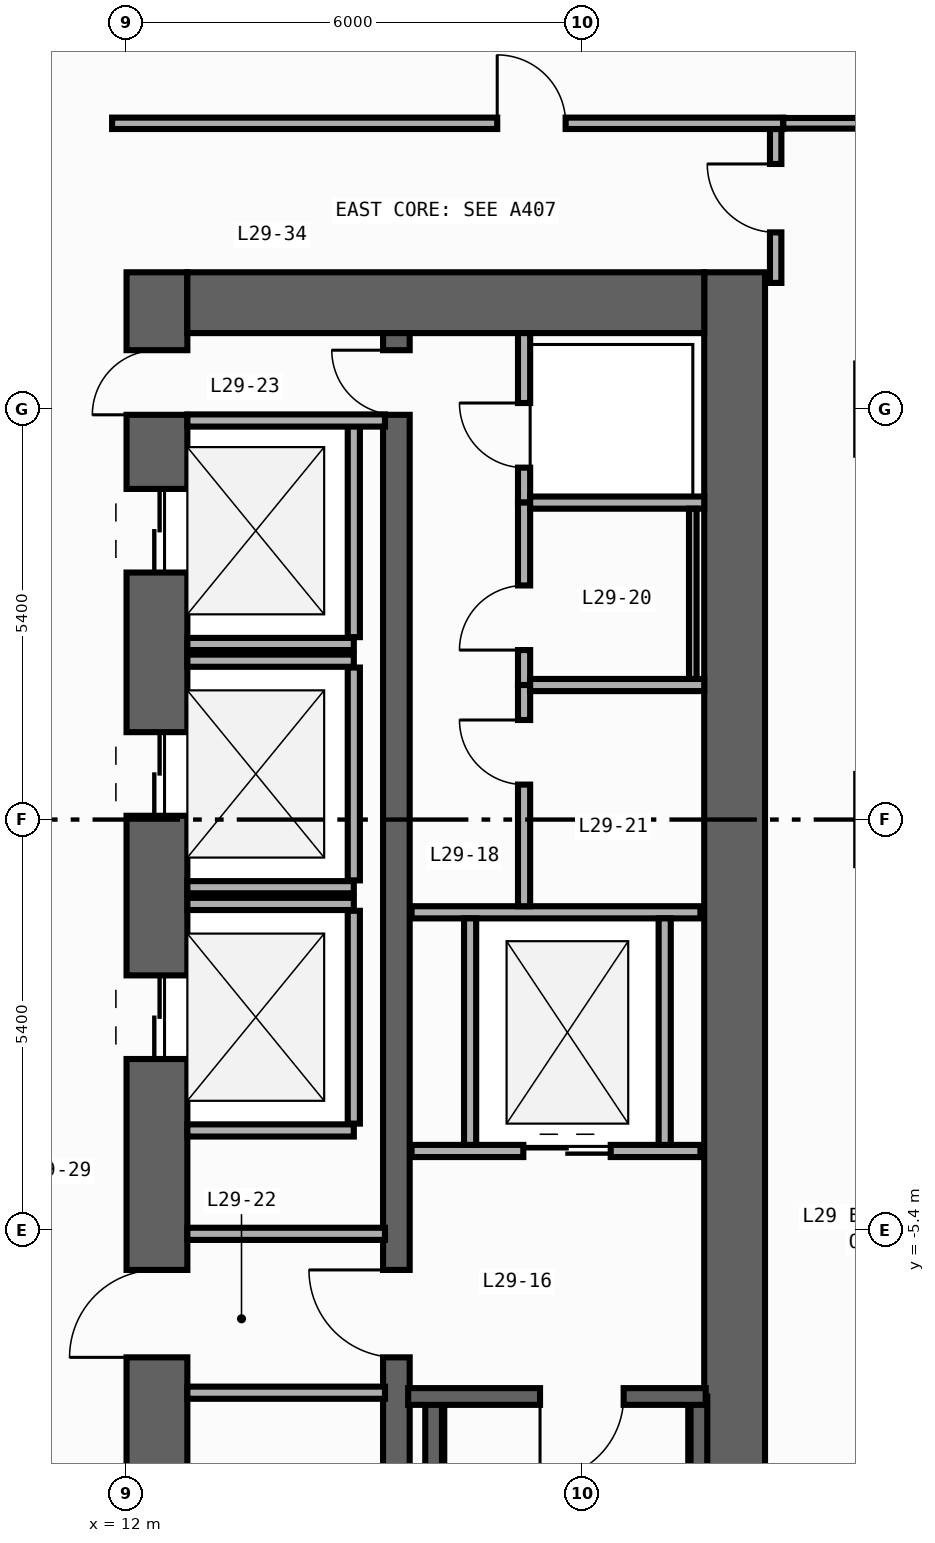
"""IFC4 building model, lengths in metres.
Left out: names, types, materials, properties, quantities, classifications, styles, units other than length and angle.
Written with IfcOpenShell. Run it as: python <this file> out.ifc"""

import sys

from ifc_helpers import new_model, si_unit, direction, frame, frame_2d, origin, origin_2d, place, context, subcontext, project, spatial, rectangle, extrude, element, fill, save


model = new_model("IFC4")
c1 = context("Model", 3, precision=1e-05, world=origin(), true_north=direction((0.0, 1.0)))
c2 = subcontext(c1, "Body", "Model", "MODEL_VIEW")
j1 = project(units=[si_unit("LENGTHUNIT", "METRE"), si_unit("PLANEANGLEUNIT", "RADIAN")], contexts=[c1])
p1 = place(None, origin())
s1 = spatial("IfcSite", under=j1, at=p1, CompositionType="ELEMENT")
p2 = place(p1, origin())
s2 = spatial("IfcBuilding", under=s1, at=p2, CompositionType="ELEMENT")
p3 = place(p2, frame((0.0, 0.0, 126.8)))
s3 = spatial("IfcBuildingStorey", under=s2, at=p3, CompositionType="ELEMENT", Elevation=126.8)
p4 = place(p3, frame((12.4, -19.8, 0.0), z_axis=(0.0, 0.0, 1.0), x_axis=(0.0, 1.0, 0.0)))
e1 = element("IfcWall", 1, at=p4, inside=s3, PredefinedType="SHEAR", context=c2, shape_type="SweptSolid", body=[
    extrude(rectangle(XDim=27.0, YDim=0.8, at=frame_2d((13.5, 0.0))), origin(), (0.0, 0.0, 1.0), 3.94),
])
p5 = place(p4, frame((23.05, 0.0, 0.0)))
e2 = element("IfcOpeningElement", 2, at=p5, cuts=e1, PredefinedType="OPENING", context=c2, shape_type="SweptSolid", body=[
    extrude(rectangle(XDim=1.1, YDim=2.2, at=frame_2d((0.55, 1.1))), frame((0.0, 0.41, 0.0), z_axis=(0.0, -1.0, 0.0), x_axis=(1.0, 0.0, 0.0)), (0.0, 0.0, 1.0), 0.82),
])
p6 = place(p4, frame((19.85, 0.0, 0.0)))
e3 = element("IfcOpeningElement", 3, at=p6, cuts=e1, PredefinedType="OPENING", context=c2, shape_type="SweptSolid", body=[
    extrude(rectangle(XDim=1.1, YDim=2.2, at=frame_2d((0.55, 1.1))), frame((0.0, 0.41, 0.0), z_axis=(0.0, -1.0, 0.0), x_axis=(1.0, 0.0, 0.0)), (0.0, 0.0, 1.0), 0.82),
])
p7 = place(p4, frame((16.65, 0.0, 0.0)))
e4 = element("IfcOpeningElement", 4, at=p7, cuts=e1, PredefinedType="OPENING", context=c2, shape_type="SweptSolid", body=[
    extrude(rectangle(XDim=1.1, YDim=2.2, at=frame_2d((0.55, 1.1))), frame((0.0, 0.41, 0.0), z_axis=(0.0, -1.0, 0.0), x_axis=(1.0, 0.0, 0.0)), (0.0, 0.0, 1.0), 0.82),
])
p8 = place(p4, frame((10.175, 0.0, 0.0)))
e5 = element("IfcOpeningElement", 5, at=p8, cuts=e1, PredefinedType="OPENING", context=c2, shape_type="SweptSolid", body=[
    extrude(rectangle(XDim=0.85, YDim=2.1, at=frame_2d((0.425, 1.05))), frame((0.0, 0.41, 0.0), z_axis=(0.0, -1.0, 0.0), x_axis=(1.0, 0.0, 0.0)), (0.0, 0.0, 1.0), 0.82),
])
p9 = place(p4, frame((12.725, 0.0, 0.0)))
e6 = element("IfcOpeningElement", 6, at=p9, cuts=e1, PredefinedType="OPENING", context=c2, shape_type="SweptSolid", body=[
    extrude(rectangle(XDim=1.15, YDim=2.2, at=frame_2d((0.575, 1.1))), frame((0.0, 0.41, 0.0), z_axis=(0.0, -1.0, 0.0), x_axis=(1.0, 0.0, 0.0)), (0.0, 0.0, 1.0), 0.82),
])
p10 = place(p4, frame((25.125, 0.0, 0.0)))
e7 = element("IfcOpeningElement", 7, at=p10, cuts=e1, PredefinedType="OPENING", context=c2, shape_type="SweptSolid", body=[
    extrude(rectangle(XDim=0.85, YDim=2.1, at=frame_2d((0.425, 1.05))), frame((0.0, 0.41, 0.0), z_axis=(0.0, -1.0, 0.0), x_axis=(1.0, 0.0, 0.0)), (0.0, 0.0, 1.0), 0.82),
])
p11 = place(p3, frame((20.0, -19.8, 0.0), z_axis=(0.0, 0.0, 1.0), x_axis=(0.0, 1.0, 0.0)))
e8 = element("IfcWall", 8, at=p11, inside=s3, PredefinedType="SHEAR", context=c2, shape_type="SweptSolid", body=[
    extrude(rectangle(XDim=27.0, YDim=0.8, at=frame_2d((13.5, 0.0))), origin(), (0.0, 0.0, 1.0), 3.94),
])
p12 = place(p3, frame((12.8, 6.8, 0.0), z_axis=(0.0, 0.0, 1.0), x_axis=(1.0, 0.0, 0.0)))
e9 = element("IfcWall", 9, at=p12, inside=s3, PredefinedType="SHEAR", context=c2, shape_type="SweptSolid", body=[
    extrude(rectangle(XDim=6.8, YDim=0.8, at=frame_2d((3.4, 0.0))), origin(), (0.0, 0.0, 1.0), 3.94),
])
p13 = place(p3, frame((15.55, -19.0, 0.0), z_axis=(0.0, 0.0, 1.0), x_axis=(0.0, 1.0, 0.0)))
e10 = element("IfcWall", 10, at=p13, inside=s3, PredefinedType="SHEAR", context=c2, shape_type="SweptSolid", body=[
    extrude(rectangle(XDim=25.4, YDim=0.35, at=frame_2d((12.7, 0.0))), origin(), (0.0, 0.0, 1.0), 3.94),
])
p14 = place(p13, frame((11.925, 0.0, 0.0)))
e11 = element("IfcOpeningElement", 11, at=p14, cuts=e10, PredefinedType="OPENING", context=c2, shape_type="SweptSolid", body=[
    extrude(rectangle(XDim=1.15, YDim=2.2, at=frame_2d((0.575, 1.1))), frame((0.0, 0.185, 0.0), z_axis=(0.0, -1.0, 0.0), x_axis=(1.0, 0.0, 0.0)), (0.0, 0.0, 1.0), 0.37),
])
p15 = place(p13, frame((24.325, 0.0, 0.0)))
e12 = element("IfcOpeningElement", 12, at=p15, cuts=e10, PredefinedType="OPENING", context=c2, shape_type="SweptSolid", body=[
    extrude(rectangle(XDim=0.85, YDim=2.1, at=frame_2d((0.425, 1.05))), frame((0.0, 0.185, 0.0), z_axis=(0.0, -1.0, 0.0), x_axis=(1.0, 0.0, 0.0)), (0.0, 0.0, 1.0), 0.37),
])
for number, where, z_axis, x_axis in (
    (13, (16.04, -18.89, 0.0), (0.0, 0.0, 1.0), (0.0, 1.0, 0.0)),
    (14, (19.53, -18.89, 0.0), (0.0, 0.0, 1.0), (0.0, 1.0, 0.0)),
):
    element("IfcWall", number, at=place(p3, frame(where, z_axis=z_axis, x_axis=x_axis)), inside=s3, PredefinedType="SHEAR", context=c2, shape_type="SweptSolid", body=[
        extrude(rectangle(XDim=11.3, YDim=0.22, at=frame_2d((5.65, 0.0))), origin(), (0.0, 0.0, 1.0), 3.94),
    ])
p16 = place(p3, frame((19.62, -7.59, 0.0), z_axis=(0.0, 0.0, 1.0), x_axis=(-1.0, 0.0, 0.0)))
e15 = element("IfcWall", 15, at=p16, inside=s3, PredefinedType="SHEAR", context=c2, shape_type="SweptSolid", body=[
    extrude(rectangle(XDim=3.915, YDim=0.22, at=frame_2d((1.958, 0.0))), origin(), (0.0, 0.0, 1.0), 3.94),
])
p17 = place(p16, frame((1.08, 0.0, 0.0)))
e16 = element("IfcOpeningElement", 16, at=p17, cuts=e15, PredefinedType="OPENING", context=c2, shape_type="SweptSolid", body=[
    extrude(rectangle(XDim=1.1, YDim=2.2, at=frame_2d((0.55, 1.1))), frame((0.0, 0.12, 0.0), z_axis=(0.0, -1.0, 0.0), x_axis=(1.0, 0.0, 0.0)), (0.0, 0.0, 1.0), 0.24),
])
for number, where, z_axis, x_axis in (
    (17, (22.2, 0.0, 0.0), (0.0, 0.0, 1.0), (1.0, 0.0, 0.0)),
    (18, (22.2, 5.4, 0.0), (0.0, 0.0, 1.0), (1.0, 0.0, 0.0)),
):
    element("IfcColumn", number, at=place(p3, frame(where, z_axis=z_axis, x_axis=x_axis)), inside=s3, PredefinedType="COLUMN", context=c2, shape_type="SweptSolid", body=[
        extrude(rectangle(XDim=1.2, YDim=1.2, at=origin_2d()), origin(), (0.0, 0.0, 1.0), 4.2),
    ])
p18 = place(p3, frame((12.8, 2.31, 0.0), z_axis=(0.0, 0.0, 1.0), x_axis=(1.0, 0.0, 0.0)))
e19 = element("IfcWall", 19, at=p18, inside=s3, PredefinedType="STANDARD", context=c2, shape_type="SweptSolid", body=[
    extrude(rectangle(XDim=2.19, YDim=0.16, at=frame_2d((1.095, 0.0))), origin(), (0.0, 0.0, 1.0), 3.94),
])
p19 = place(p3, frame((14.99, 2.4, 0.0), z_axis=(0.0, 0.0, 1.0), x_axis=(0.0, 1.0, 0.0)))
e20 = element("IfcWall", 20, at=p19, inside=s3, PredefinedType="STANDARD", context=c2, shape_type="SweptSolid", body=[
    extrude(rectangle(XDim=2.8, YDim=0.16, at=frame_2d((1.4, 0.0))), origin(), (0.0, 0.0, 1.0), 3.94),
])
for number, where, z_axis, x_axis in (
    (21, (12.8, -0.89, 0.0), (0.0, 0.0, 1.0), (1.0, 0.0, 0.0)),
    (22, (12.8, 2.09, 0.0), (0.0, 0.0, 1.0), (1.0, 0.0, 0.0)),
):
    element("IfcWall", number, at=place(p3, frame(where, z_axis=z_axis, x_axis=x_axis)), inside=s3, PredefinedType="STANDARD", context=c2, shape_type="SweptSolid", body=[
        extrude(rectangle(XDim=2.19, YDim=0.16, at=frame_2d((1.095, 0.0))), origin(), (0.0, 0.0, 1.0), 3.94),
    ])
p20 = place(p3, frame((14.99, -0.8, 0.0), z_axis=(0.0, 0.0, 1.0), x_axis=(0.0, 1.0, 0.0)))
e23 = element("IfcWall", 23, at=p20, inside=s3, PredefinedType="STANDARD", context=c2, shape_type="SweptSolid", body=[
    extrude(rectangle(XDim=2.8, YDim=0.16, at=frame_2d((1.4, 0.0))), origin(), (0.0, 0.0, 1.0), 3.94),
])
for number, where, z_axis, x_axis in (
    (24, (12.8, -4.09, 0.0), (0.0, 0.0, 1.0), (1.0, 0.0, 0.0)),
    (25, (12.8, -1.11, 0.0), (0.0, 0.0, 1.0), (1.0, 0.0, 0.0)),
):
    element("IfcWall", number, at=place(p3, frame(where, z_axis=z_axis, x_axis=x_axis)), inside=s3, PredefinedType="STANDARD", context=c2, shape_type="SweptSolid", body=[
        extrude(rectangle(XDim=2.19, YDim=0.16, at=frame_2d((1.095, 0.0))), origin(), (0.0, 0.0, 1.0), 3.94),
    ])
p21 = place(p3, frame((14.99, -4.0, 0.0), z_axis=(0.0, 0.0, 1.0), x_axis=(0.0, 1.0, 0.0)))
e26 = element("IfcWall", 26, at=p21, inside=s3, PredefinedType="STANDARD", context=c2, shape_type="SweptSolid", body=[
    extrude(rectangle(XDim=2.8, YDim=0.16, at=frame_2d((1.4, 0.0))), origin(), (0.0, 0.0, 1.0), 3.94),
])
p22 = place(p3, frame((15.75, -4.36, 0.0), z_axis=(0.0, 0.0, 1.0), x_axis=(1.0, 0.0, 0.0)))
e27 = element("IfcWall", 27, at=p22, inside=s3, PredefinedType="STANDARD", context=c2, shape_type="SweptSolid", body=[
    extrude(rectangle(XDim=3.8, YDim=0.16, at=frame_2d((1.9, 0.0))), origin(), (0.0, 0.0, 1.0), 3.94),
])
p23 = place(p22, frame((1.47, 0.0, 0.0)))
e28 = element("IfcOpeningElement", 28, at=p23, cuts=e27, PredefinedType="OPENING", context=c2, shape_type="SweptSolid", body=[
    extrude(rectangle(XDim=1.15, YDim=2.2, at=frame_2d((0.575, 1.1))), frame((0.0, 0.09, 0.0), z_axis=(0.0, -1.0, 0.0), x_axis=(1.0, 0.0, 0.0)), (0.0, 0.0, 1.0), 0.18),
])
p24 = place(p3, frame((15.75, -1.22, 0.0), z_axis=(0.0, 0.0, 1.0), x_axis=(1.0, 0.0, 0.0)))
e29 = element("IfcWall", 29, at=p24, inside=s3, PredefinedType="STANDARD", context=c2, shape_type="SweptSolid", body=[
    extrude(rectangle(XDim=3.8, YDim=0.16, at=frame_2d((1.9, 0.0))), origin(), (0.0, 0.0, 1.0), 3.94),
])
for number, where, z_axis, x_axis in (
    (30, (16.52, -4.28, 0.0), (0.0, 0.0, 1.0), (0.0, 1.0, 0.0)),
    (31, (19.08, -4.28, 0.0), (0.0, 0.0, 1.0), (0.0, 1.0, 0.0)),
):
    element("IfcWall", number, at=place(p3, frame(where, z_axis=z_axis, x_axis=x_axis)), inside=s3, PredefinedType="STANDARD", context=c2, shape_type="SweptSolid", body=[
        extrude(rectangle(XDim=2.98, YDim=0.16, at=frame_2d((1.49, 0.0))), origin(), (0.0, 0.0, 1.0), 3.94),
    ])
for number, where, z_axis, x_axis in (
    (32, (12.8, -5.45, 0.0), (0.0, 0.0, 1.0), (1.0, 0.0, 0.0)),
    (33, (12.8, -7.54, 0.0), (0.0, 0.0, 1.0), (1.0, 0.0, 0.0)),
    (34, (12.8, 5.25, 0.0), (0.0, 0.0, 1.0), (1.0, 0.0, 0.0)),
):
    element("IfcWall", number, at=place(p3, frame(where, z_axis=z_axis, x_axis=x_axis)), inside=s3, PredefinedType="STANDARD", context=c2, shape_type="SweptSolid", body=[
        extrude(rectangle(XDim=2.6, YDim=0.16, at=frame_2d((1.3, 0.0))), origin(), (0.0, 0.0, 1.0), 3.94),
    ])
p25 = place(p3, frame((17.23, 4.17, 0.0), z_axis=(0.0, 0.0, 1.0), x_axis=(0.0, 1.0, 0.0)))
e35 = element("IfcWall", 35, at=p25, inside=s3, PredefinedType="PARTITIONING", context=c2, shape_type="SweptSolid", body=[
    extrude(rectangle(XDim=2.23, YDim=0.16, at=frame_2d((1.115, 0.0))), origin(), (0.0, 0.0, 1.0), 3.94),
])
p26 = place(p25, frame((0.46, 0.0, 0.0)))
e36 = element("IfcOpeningElement", 36, at=p26, cuts=e35, PredefinedType="OPENING", context=c2, shape_type="SweptSolid", body=[
    extrude(rectangle(XDim=0.85, YDim=2.1, at=frame_2d((0.425, 1.05))), frame((0.0, 0.09, 0.0), z_axis=(0.0, -1.0, 0.0), x_axis=(1.0, 0.0, 0.0)), (0.0, 0.0, 1.0), 0.18),
])
p27 = place(p3, frame((17.23, 1.77, 0.0), z_axis=(0.0, 0.0, 1.0), x_axis=(0.0, 1.0, 0.0)))
e37 = element("IfcWall", 37, at=p27, inside=s3, PredefinedType="PARTITIONING", context=c2, shape_type="SweptSolid", body=[
    extrude(rectangle(XDim=2.4, YDim=0.16, at=frame_2d((1.2, 0.0))), origin(), (0.0, 0.0, 1.0), 3.94),
])
p28 = place(p27, frame((0.46, 0.0, 0.0)))
e38 = element("IfcOpeningElement", 38, at=p28, cuts=e37, PredefinedType="OPENING", context=c2, shape_type="SweptSolid", body=[
    extrude(rectangle(XDim=0.85, YDim=2.1, at=frame_2d((0.425, 1.05))), frame((0.0, 0.09, 0.0), z_axis=(0.0, -1.0, 0.0), x_axis=(1.0, 0.0, 0.0)), (0.0, 0.0, 1.0), 0.18),
])
p29 = place(p3, frame((17.23, -1.14, 0.0), z_axis=(0.0, 0.0, 1.0), x_axis=(0.0, 1.0, 0.0)))
e39 = element("IfcWall", 39, at=p29, inside=s3, PredefinedType="PARTITIONING", context=c2, shape_type="SweptSolid", body=[
    extrude(rectangle(XDim=2.91, YDim=0.16, at=frame_2d((1.455, 0.0))), origin(), (0.0, 0.0, 1.0), 3.94),
])
p30 = place(p29, frame((1.6, 0.0, 0.0)))
e40 = element("IfcOpeningElement", 40, at=p30, cuts=e39, PredefinedType="OPENING", context=c2, shape_type="SweptSolid", body=[
    extrude(rectangle(XDim=0.85, YDim=2.1, at=frame_2d((0.425, 1.05))), frame((0.0, 0.09, 0.0), z_axis=(0.0, -1.0, 0.0), x_axis=(1.0, 0.0, 0.0)), (0.0, 0.0, 1.0), 0.18),
])
for number, where, z_axis, x_axis in (
    (41, (17.31, 4.17, 0.0), (0.0, 0.0, 1.0), (1.0, 0.0, 0.0)),
    (42, (17.31, 1.77, 0.0), (0.0, 0.0, 1.0), (1.0, 0.0, 0.0)),
):
    element("IfcWall", number, at=place(p3, frame(where, z_axis=z_axis, x_axis=x_axis)), inside=s3, PredefinedType="PARTITIONING", context=c2, shape_type="SweptSolid", body=[
        extrude(rectangle(XDim=2.29, YDim=0.16, at=frame_2d((1.145, 0.0))), origin(), (0.0, 0.0, 1.0), 3.94),
    ])
p31 = place(p3, frame((20.54, 7.06, 0.0), z_axis=(0.0, 0.0, 1.0), x_axis=(0.0, 1.0, 0.0)))
e43 = element("IfcWall", 43, at=p31, inside=s3, PredefinedType="PARTITIONING", context=c2, shape_type="SweptSolid", body=[
    extrude(rectangle(XDim=2.025, YDim=0.15, at=frame_2d((1.012, 0.0))), origin(), (0.0, 0.0, 1.0), 3.94),
])
p32 = place(p31, frame((0.665, 0.0, 0.0)))
e44 = element("IfcOpeningElement", 44, at=p32, cuts=e43, PredefinedType="OPENING", context=c2, shape_type="SweptSolid", body=[
    extrude(rectangle(XDim=0.9, YDim=2.15, at=frame_2d((0.45, 1.075))), frame((0.0, 0.085, 0.0), z_axis=(0.0, -1.0, 0.0), x_axis=(1.0, 0.0, 0.0)), (0.0, 0.0, 1.0), 0.17),
])
p33 = place(p3, frame((11.81, 9.16, 0.0), z_axis=(0.0, 0.0, 1.0), x_axis=(1.0, 0.0, 0.0)))
e45 = element("IfcWall", 45, at=p33, inside=s3, PredefinedType="PARTITIONING", context=c2, shape_type="SweptSolid", body=[
    extrude(rectangle(XDim=8.83, YDim=0.15, at=frame_2d((4.415, 0.0))), origin(), (0.0, 0.0, 1.0), 3.94),
])
p34 = place(p33, frame((5.067, 0.0, 0.0)))
e46 = element("IfcOpeningElement", 46, at=p34, cuts=e45, PredefinedType="OPENING", context=c2, shape_type="SweptSolid", body=[
    extrude(rectangle(XDim=0.9, YDim=2.15, at=frame_2d((0.45, 1.075))), frame((0.0, 0.085, 0.0), z_axis=(0.0, -1.0, 0.0), x_axis=(1.0, 0.0, 0.0)), (0.0, 0.0, 1.0), 0.17),
])
p35 = place(p3, frame((20.64, 9.16, 0.0), z_axis=(0.0, 0.0, 1.0), x_axis=(1.0, 0.0, 0.0)))
e47 = element("IfcWall", 47, at=p35, inside=s3, PredefinedType="PARTITIONING", context=c2, shape_type="SweptSolid", body=[
    extrude(rectangle(XDim=2.815, YDim=0.14, at=frame_2d((1.408, 0.0))), origin(), (0.0, 0.0, 1.0), 3.94),
])
p36 = place(p3, frame((19.45, 4.09, 0.0), z_axis=(0.0, 0.0, 1.0), x_axis=(0.0, -1.0, 0.0)))
e48 = element("IfcWall", 48, at=p36, inside=s3, PredefinedType="PARTITIONING", context=c2, shape_type="SweptSolid", body=[
    extrude(rectangle(XDim=2.24, YDim=0.1, at=frame_2d((1.12, 0.0))), origin(), (0.0, 0.0, 1.0), 3.94),
])
p37 = place(p17, origin())
e49 = element("IfcDoor", 49, at=p37, inside=s3, OperationType="SINGLE_SWING_RIGHT", PredefinedType="DOOR", context=c2, shape_type="SweptSolid", body=[
    extrude(rectangle(XDim=1.1, YDim=2.2, at=frame_2d((0.55, 1.1))), frame((0.0, 0.025, 0.0), z_axis=(0.0, -1.0, 0.0), x_axis=(1.0, 0.0, 0.0)), (0.0, 0.0, 1.0), 0.05),
])
fill(e16, e49)
p38 = place(p5, origin())
e50 = element("IfcDoor", 50, at=p38, inside=s3, OperationType="DOUBLE_DOOR_SLIDING", PredefinedType="DOOR", context=c2, shape_type="SweptSolid", body=[
    extrude(rectangle(XDim=1.1, YDim=2.2, at=frame_2d((0.55, 1.1))), frame((0.0, 0.025, 0.0), z_axis=(0.0, -1.0, 0.0), x_axis=(1.0, 0.0, 0.0)), (0.0, 0.0, 1.0), 0.05),
])
fill(e2, e50)
p39 = place(p6, origin())
e51 = element("IfcDoor", 51, at=p39, inside=s3, OperationType="DOUBLE_DOOR_SLIDING", PredefinedType="DOOR", context=c2, shape_type="SweptSolid", body=[
    extrude(rectangle(XDim=1.1, YDim=2.2, at=frame_2d((0.55, 1.1))), frame((0.0, 0.025, 0.0), z_axis=(0.0, -1.0, 0.0), x_axis=(1.0, 0.0, 0.0)), (0.0, 0.0, 1.0), 0.05),
])
fill(e3, e51)
p40 = place(p7, origin())
e52 = element("IfcDoor", 52, at=p40, inside=s3, OperationType="DOUBLE_DOOR_SLIDING", PredefinedType="DOOR", context=c2, shape_type="SweptSolid", body=[
    extrude(rectangle(XDim=1.1, YDim=2.2, at=frame_2d((0.55, 1.1))), frame((0.0, 0.025, 0.0), z_axis=(0.0, -1.0, 0.0), x_axis=(1.0, 0.0, 0.0)), (0.0, 0.0, 1.0), 0.05),
])
fill(e4, e52)
p41 = place(p9, origin())
e53 = element("IfcDoor", 53, at=p41, inside=s3, OperationType="SINGLE_SWING_LEFT", PredefinedType="DOOR", context=c2, shape_type="SweptSolid", body=[
    extrude(rectangle(XDim=1.15, YDim=2.2, at=frame_2d((0.575, 1.1))), frame((0.0, 0.025, 0.0), z_axis=(0.0, -1.0, 0.0), x_axis=(1.0, 0.0, 0.0)), (0.0, 0.0, 1.0), 0.05),
])
fill(e6, e53)
p42 = place(p14, origin())
e54 = element("IfcDoor", 54, at=p42, inside=s3, OperationType="SINGLE_SWING_RIGHT", PredefinedType="DOOR", context=c2, shape_type="SweptSolid", body=[
    extrude(rectangle(XDim=1.15, YDim=2.2, at=frame_2d((0.575, 1.1))), frame((0.0, 0.025, 0.0), z_axis=(0.0, -1.0, 0.0), x_axis=(1.0, 0.0, 0.0)), (0.0, 0.0, 1.0), 0.05),
])
fill(e11, e54)
p43 = place(p10, origin())
e55 = element("IfcDoor", 55, at=p43, inside=s3, OperationType="SINGLE_SWING_LEFT", PredefinedType="DOOR", context=c2, shape_type="SweptSolid", body=[
    extrude(rectangle(XDim=0.85, YDim=2.1, at=frame_2d((0.425, 1.05))), frame((0.0, 0.025, 0.0), z_axis=(0.0, -1.0, 0.0), x_axis=(1.0, 0.0, 0.0)), (0.0, 0.0, 1.0), 0.05),
])
fill(e7, e55)
p44 = place(p15, origin())
e56 = element("IfcDoor", 56, at=p44, inside=s3, OperationType="SINGLE_SWING_RIGHT", PredefinedType="DOOR", context=c2, shape_type="SweptSolid", body=[
    extrude(rectangle(XDim=0.85, YDim=2.1, at=frame_2d((0.425, 1.05))), frame((0.0, 0.025, 0.0), z_axis=(0.0, -1.0, 0.0), x_axis=(1.0, 0.0, 0.0)), (0.0, 0.0, 1.0), 0.05),
])
fill(e12, e56)
p45 = place(p23, origin())
e57 = element("IfcDoor", 57, at=p45, inside=s3, OperationType="DOUBLE_DOOR_SLIDING", PredefinedType="DOOR", context=c2, shape_type="SweptSolid", body=[
    extrude(rectangle(XDim=1.15, YDim=2.2, at=frame_2d((0.575, 1.1))), frame((0.0, 0.025, 0.0), z_axis=(0.0, -1.0, 0.0), x_axis=(1.0, 0.0, 0.0)), (0.0, 0.0, 1.0), 0.05),
])
fill(e28, e57)
p46 = place(p26, origin())
e58 = element("IfcDoor", 58, at=p46, inside=s3, OperationType="SINGLE_SWING_RIGHT", PredefinedType="DOOR", context=c2, shape_type="SweptSolid", body=[
    extrude(rectangle(XDim=0.85, YDim=2.1, at=frame_2d((0.425, 1.05))), frame((0.0, 0.025, 0.0), z_axis=(0.0, -1.0, 0.0), x_axis=(1.0, 0.0, 0.0)), (0.0, 0.0, 1.0), 0.05),
])
fill(e36, e58)
p47 = place(p28, origin())
e59 = element("IfcDoor", 59, at=p47, inside=s3, OperationType="SINGLE_SWING_LEFT", PredefinedType="DOOR", context=c2, shape_type="SweptSolid", body=[
    extrude(rectangle(XDim=0.85, YDim=2.1, at=frame_2d((0.425, 1.05))), frame((0.0, 0.025, 0.0), z_axis=(0.0, -1.0, 0.0), x_axis=(1.0, 0.0, 0.0)), (0.0, 0.0, 1.0), 0.05),
])
fill(e38, e59)
p48 = place(p30, origin())
e60 = element("IfcDoor", 60, at=p48, inside=s3, OperationType="SINGLE_SWING_RIGHT", PredefinedType="DOOR", context=c2, shape_type="SweptSolid", body=[
    extrude(rectangle(XDim=0.85, YDim=2.1, at=frame_2d((0.425, 1.05))), frame((0.0, 0.025, 0.0), z_axis=(0.0, -1.0, 0.0), x_axis=(1.0, 0.0, 0.0)), (0.0, 0.0, 1.0), 0.05),
])
fill(e40, e60)
p49 = place(p32, origin())
e61 = element("IfcDoor", 61, at=p49, inside=s3, OperationType="SINGLE_SWING_RIGHT", PredefinedType="DOOR", context=c2, shape_type="SweptSolid", body=[
    extrude(rectangle(XDim=0.9, YDim=2.15, at=frame_2d((0.45, 1.075))), frame((0.0, 0.025, 0.0), z_axis=(0.0, -1.0, 0.0), x_axis=(1.0, 0.0, 0.0)), (0.0, 0.0, 1.0), 0.05),
])
fill(e44, e61)
p50 = place(p34, origin())
e62 = element("IfcDoor", 62, at=p50, inside=s3, OperationType="SINGLE_SWING_LEFT", PredefinedType="DOOR", context=c2, shape_type="SweptSolid", body=[
    extrude(rectangle(XDim=0.9, YDim=2.15, at=frame_2d((0.45, 1.075))), frame((0.0, 0.025, 0.0), z_axis=(0.0, -1.0, 0.0), x_axis=(1.0, 0.0, 0.0)), (0.0, 0.0, 1.0), 0.05),
])
fill(e46, e62)
save(model, sys.argv[1])
